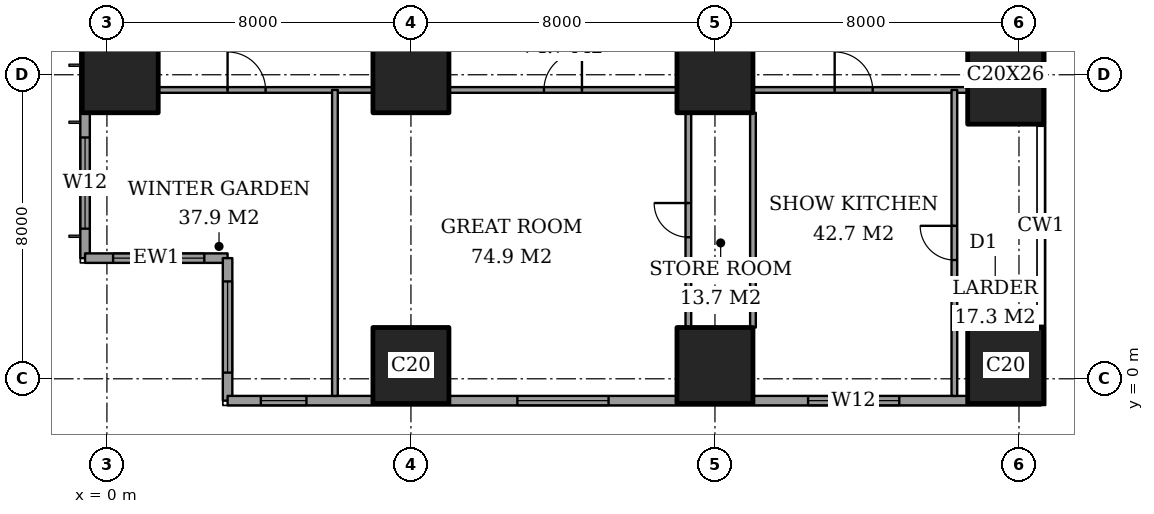
"""IFC4 building model, lengths in metres.
Left out: names, types, materials, properties, quantities, classifications, styles, units other than length and angle.
Written with IfcOpenShell. Run it as: python <this file> out.ifc"""

import sys

from ifc_helpers import new_model, si_unit, direction, frame, frame_2d, origin, origin_2d, place, context, subcontext, project, spatial, rectangle, extrude, element, fill, save


model = new_model("IFC4")
c1 = context("Model", 3, precision=1e-05, world=origin(), true_north=direction((0.0, 1.0)))
c2 = subcontext(c1, "Body", "Model", "MODEL_VIEW")
j1 = project(units=[si_unit("LENGTHUNIT", "METRE"), si_unit("PLANEANGLEUNIT", "RADIAN")], contexts=[c1])
p1 = place(None, origin())
s1 = spatial("IfcSite", under=j1, at=p1, CompositionType="ELEMENT")
p2 = place(p1, origin())
s2 = spatial("IfcBuilding", under=s1, at=p2, CompositionType="ELEMENT")
p3 = place(p2, frame((0.0, 0.0, 110.6)))
s3 = spatial("IfcBuildingStorey", under=s2, at=p3, CompositionType="ELEMENT", Elevation=110.6)
for number, where, z_axis, x_axis in (
    (1, (0.35, 8.0, 0.0), (0.0, 0.0, 1.0), (1.0, 0.0, 0.0)),
    (2, (8.0, 0.35, 0.0), (0.0, 0.0, 1.0), (1.0, 0.0, 0.0)),
    (3, (8.0, 8.0, 0.0), (0.0, 0.0, 1.0), (1.0, 0.0, 0.0)),
    (4, (16.0, 0.35, 0.0), (0.0, 0.0, 1.0), (1.0, 0.0, 0.0)),
    (5, (16.0, 8.0, 0.0), (0.0, 0.0, 1.0), (1.0, 0.0, 0.0)),
    (6, (23.65, 0.35, 0.0), (0.0, 0.0, 1.0), (1.0, 0.0, 0.0)),
):
    element("IfcColumn", number, at=place(p3, frame(where, z_axis=z_axis, x_axis=x_axis)), inside=s3, PredefinedType="COLUMN", context=c2, shape_type="SweptSolid", body=[
        extrude(rectangle(XDim=2.0, YDim=2.0, at=origin_2d()), origin(), (0.0, 0.0, 1.0), 3.6),
    ])
p4 = place(p3, frame((23.65, 8.0, 0.0), z_axis=(0.0, 0.0, 1.0), x_axis=(1.0, 0.0, 0.0)))
e7 = element("IfcColumn", 7, at=p4, inside=s3, PredefinedType="COLUMN", context=c2, shape_type="SweptSolid", body=[
    extrude(rectangle(XDim=2.0, YDim=2.6, at=origin_2d()), origin(), (0.0, 0.0, 1.0), 3.6),
])
p5 = place(p3, frame((-0.575, 44.825, 0.0), z_axis=(0.0, 0.0, 1.0), x_axis=(0.0, -1.0, 0.0)))
e8 = element("IfcWall", 8, at=p5, inside=s3, PredefinedType="SOLIDWALL", context=c2, shape_type="SweptSolid", body=[
    extrude(rectangle(XDim=41.65, YDim=0.25, at=frame_2d((20.825, 0.0))), origin(), (0.0, 0.0, 1.0), 3.6),
])
p6 = place(p5, frame((0.775, 0.0, 0.4)))
e9 = element("IfcOpeningElement", 9, at=p6, cuts=e8, PredefinedType="OPENING", context=c2, shape_type="SweptSolid", body=[
    extrude(rectangle(XDim=2.4, YDim=2.2, at=frame_2d((1.2, 1.1))), frame((0.0, 0.135, 0.0), z_axis=(0.0, -1.0, 0.0), x_axis=(1.0, 0.0, 0.0)), (0.0, 0.0, 1.0), 0.27),
])
p7 = place(p5, frame((6.2, 0.0, 0.4)))
e10 = element("IfcOpeningElement", 10, at=p7, cuts=e8, PredefinedType="OPENING", context=c2, shape_type="SweptSolid", body=[
    extrude(rectangle(XDim=1.2, YDim=2.2, at=frame_2d((0.6, 1.1))), frame((0.0, 0.135, 0.0), z_axis=(0.0, -1.0, 0.0), x_axis=(1.0, 0.0, 0.0)), (0.0, 0.0, 1.0), 0.27),
])
p8 = place(p5, frame((8.525, 0.0, 0.4)))
e11 = element("IfcOpeningElement", 11, at=p8, cuts=e8, PredefinedType="OPENING", context=c2, shape_type="SweptSolid", body=[
    extrude(rectangle(XDim=2.4, YDim=2.2, at=frame_2d((1.2, 1.1))), frame((0.0, 0.135, 0.0), z_axis=(0.0, -1.0, 0.0), x_axis=(1.0, 0.0, 0.0)), (0.0, 0.0, 1.0), 0.27),
])
p9 = place(p5, frame((15.625, 0.0, 0.4)))
e12 = element("IfcOpeningElement", 12, at=p9, cuts=e8, PredefinedType="OPENING", context=c2, shape_type="SweptSolid", body=[
    extrude(rectangle(XDim=2.4, YDim=2.2, at=frame_2d((1.2, 1.1))), frame((0.0, 0.135, 0.0), z_axis=(0.0, -1.0, 0.0), x_axis=(1.0, 0.0, 0.0)), (0.0, 0.0, 1.0), 0.27),
])
p10 = place(p5, frame((23.625, 0.0, 0.4)))
e13 = element("IfcOpeningElement", 13, at=p10, cuts=e8, PredefinedType="OPENING", context=c2, shape_type="SweptSolid", body=[
    extrude(rectangle(XDim=2.4, YDim=2.2, at=frame_2d((1.2, 1.1))), frame((0.0, 0.135, 0.0), z_axis=(0.0, -1.0, 0.0), x_axis=(1.0, 0.0, 0.0)), (0.0, 0.0, 1.0), 0.27),
])
p11 = place(p5, frame((30.825, 0.0, 0.4)))
e14 = element("IfcOpeningElement", 14, at=p11, cuts=e8, PredefinedType="OPENING", context=c2, shape_type="SweptSolid", body=[
    extrude(rectangle(XDim=2.4, YDim=2.2, at=frame_2d((1.2, 1.1))), frame((0.0, 0.135, 0.0), z_axis=(0.0, -1.0, 0.0), x_axis=(1.0, 0.0, 0.0)), (0.0, 0.0, 1.0), 0.27),
])
p12 = place(p5, frame((34.5, 0.0, 0.4)))
e15 = element("IfcOpeningElement", 15, at=p12, cuts=e8, PredefinedType="OPENING", context=c2, shape_type="SweptSolid", body=[
    extrude(rectangle(XDim=1.2, YDim=2.2, at=frame_2d((0.6, 1.1))), frame((0.0, 0.135, 0.0), z_axis=(0.0, -1.0, 0.0), x_axis=(1.0, 0.0, 0.0)), (0.0, 0.0, 1.0), 0.27),
])
p13 = place(p5, frame((38.475, 0.0, 0.4)))
e16 = element("IfcOpeningElement", 16, at=p13, cuts=e8, PredefinedType="OPENING", context=c2, shape_type="SweptSolid", body=[
    extrude(rectangle(XDim=2.4, YDim=2.2, at=frame_2d((1.2, 1.1))), frame((0.0, 0.135, 0.0), z_axis=(0.0, -1.0, 0.0), x_axis=(1.0, 0.0, 0.0)), (0.0, 0.0, 1.0), 0.27),
])
p14 = place(p3, frame((-0.575, 3.175, 0.0), z_axis=(0.0, 0.0, 1.0), x_axis=(1.0, 0.0, 0.0)))
e17 = element("IfcWall", 17, at=p14, inside=s3, PredefinedType="SOLIDWALL", context=c2, shape_type="SweptSolid", body=[
    extrude(rectangle(XDim=3.75, YDim=0.25, at=frame_2d((1.875, 0.0))), origin(), (0.0, 0.0, 1.0), 3.6),
])
p15 = place(p14, frame((0.738, 0.0, 0.4)))
e18 = element("IfcOpeningElement", 18, at=p15, cuts=e17, PredefinedType="OPENING", context=c2, shape_type="SweptSolid", body=[
    extrude(rectangle(XDim=2.4, YDim=2.2, at=frame_2d((1.2, 1.1))), frame((0.0, 0.135, 0.0), z_axis=(0.0, -1.0, 0.0), x_axis=(1.0, 0.0, 0.0)), (0.0, 0.0, 1.0), 0.27),
])
p16 = place(p3, frame((3.175, 3.175, 0.0), z_axis=(0.0, 0.0, 1.0), x_axis=(0.0, -1.0, 0.0)))
e19 = element("IfcWall", 19, at=p16, inside=s3, PredefinedType="SOLIDWALL", context=c2, shape_type="SweptSolid", body=[
    extrude(rectangle(XDim=3.75, YDim=0.25, at=frame_2d((1.875, 0.0))), origin(), (0.0, 0.0, 1.0), 3.6),
])
p17 = place(p16, frame((0.613, 0.0, 0.4)))
e20 = element("IfcOpeningElement", 20, at=p17, cuts=e19, PredefinedType="OPENING", context=c2, shape_type="SweptSolid", body=[
    extrude(rectangle(XDim=2.4, YDim=2.2, at=frame_2d((1.2, 1.1))), frame((0.0, 0.135, 0.0), z_axis=(0.0, -1.0, 0.0), x_axis=(1.0, 0.0, 0.0)), (0.0, 0.0, 1.0), 0.27),
])
p18 = place(p3, frame((3.175, -0.575, 0.0), z_axis=(0.0, 0.0, 1.0), x_axis=(1.0, 0.0, 0.0)))
e21 = element("IfcWall", 21, at=p18, inside=s3, PredefinedType="SOLIDWALL", context=c2, shape_type="SweptSolid", body=[
    extrude(rectangle(XDim=21.4, YDim=0.25, at=frame_2d((10.7, 0.0))), origin(), (0.0, 0.0, 1.0), 3.6),
])
p19 = place(p18, frame((0.875, 0.0, 0.4)))
e22 = element("IfcOpeningElement", 22, at=p19, cuts=e21, PredefinedType="OPENING", context=c2, shape_type="SweptSolid", body=[
    extrude(rectangle(XDim=1.2, YDim=2.2, at=frame_2d((0.6, 1.1))), frame((0.0, 0.135, 0.0), z_axis=(0.0, -1.0, 0.0), x_axis=(1.0, 0.0, 0.0)), (0.0, 0.0, 1.0), 0.27),
])
p20 = place(p18, frame((7.625, 0.0, 0.4)))
e23 = element("IfcOpeningElement", 23, at=p20, cuts=e21, PredefinedType="OPENING", context=c2, shape_type="SweptSolid", body=[
    extrude(rectangle(XDim=2.4, YDim=2.2, at=frame_2d((1.2, 1.1))), frame((0.0, 0.135, 0.0), z_axis=(0.0, -1.0, 0.0), x_axis=(1.0, 0.0, 0.0)), (0.0, 0.0, 1.0), 0.27),
])
p21 = place(p18, frame((15.275, 0.0, 0.4)))
e24 = element("IfcOpeningElement", 24, at=p21, cuts=e21, PredefinedType="OPENING", context=c2, shape_type="SweptSolid", body=[
    extrude(rectangle(XDim=2.4, YDim=2.2, at=frame_2d((1.2, 1.1))), frame((0.0, 0.135, 0.0), z_axis=(0.0, -1.0, 0.0), x_axis=(1.0, 0.0, 0.0)), (0.0, 0.0, 1.0), 0.27),
])
p22 = place(p3, frame((1.35, 7.6, 0.0), z_axis=(0.0, 0.0, 1.0), x_axis=(1.0, 0.0, 0.0)))
e25 = element("IfcWall", 25, at=p22, inside=s3, PredefinedType="PARTITIONING", context=c2, shape_type="SweptSolid", body=[
    extrude(rectangle(XDim=5.65, YDim=0.15, at=frame_2d((2.825, 0.0))), origin(), (0.0, 0.0, 1.0), 3.35),
])
p23 = place(p22, frame((1.825, 0.0, 0.0)))
e26 = element("IfcOpeningElement", 26, at=p23, cuts=e25, PredefinedType="OPENING", context=c2, shape_type="SweptSolid", body=[
    extrude(rectangle(XDim=1.0, YDim=2.1, at=frame_2d((0.5, 1.05))), frame((0.0, 0.085, 0.0), z_axis=(0.0, -1.0, 0.0), x_axis=(1.0, 0.0, 0.0)), (0.0, 0.0, 1.0), 0.17),
])
p24 = place(p3, frame((9.0, 7.6, 0.0), z_axis=(0.0, 0.0, 1.0), x_axis=(1.0, 0.0, 0.0)))
e27 = element("IfcWall", 27, at=p24, inside=s3, PredefinedType="PARTITIONING", context=c2, shape_type="SweptSolid", body=[
    extrude(rectangle(XDim=6.0, YDim=0.15, at=frame_2d((3.0, 0.0))), origin(), (0.0, 0.0, 1.0), 3.35),
])
p25 = place(p24, frame((2.5, 0.0, 0.0)))
e28 = element("IfcOpeningElement", 28, at=p25, cuts=e27, PredefinedType="OPENING", context=c2, shape_type="SweptSolid", body=[
    extrude(rectangle(XDim=1.0, YDim=2.1, at=frame_2d((0.5, 1.05))), frame((0.0, 0.085, 0.0), z_axis=(0.0, -1.0, 0.0), x_axis=(1.0, 0.0, 0.0)), (0.0, 0.0, 1.0), 0.17),
])
p26 = place(p3, frame((17.0, 7.6, 0.0), z_axis=(0.0, 0.0, 1.0), x_axis=(1.0, 0.0, 0.0)))
e29 = element("IfcWall", 29, at=p26, inside=s3, PredefinedType="PARTITIONING", context=c2, shape_type="SweptSolid", body=[
    extrude(rectangle(XDim=5.65, YDim=0.15, at=frame_2d((2.825, 0.0))), origin(), (0.0, 0.0, 1.0), 3.35),
])
p27 = place(p26, frame((2.15, 0.0, 0.0)))
e30 = element("IfcOpeningElement", 30, at=p27, cuts=e29, PredefinedType="OPENING", context=c2, shape_type="SweptSolid", body=[
    extrude(rectangle(XDim=1.0, YDim=2.1, at=frame_2d((0.5, 1.05))), frame((0.0, 0.085, 0.0), z_axis=(0.0, -1.0, 0.0), x_axis=(1.0, 0.0, 0.0)), (0.0, 0.0, 1.0), 0.17),
])
p28 = place(p3, frame((6.0, -0.45, 0.0), z_axis=(0.0, 0.0, 1.0), x_axis=(0.0, 1.0, 0.0)))
e31 = element("IfcWall", 31, at=p28, inside=s3, PredefinedType="PARTITIONING", context=c2, shape_type="SweptSolid", body=[
    extrude(rectangle(XDim=8.05, YDim=0.15, at=frame_2d((4.025, 0.0))), origin(), (0.0, 0.0, 1.0), 3.35),
])
p29 = place(p3, frame((15.3, 1.35, 0.0), z_axis=(0.0, 0.0, 1.0), x_axis=(0.0, 1.0, 0.0)))
e32 = element("IfcWall", 32, at=p29, inside=s3, PredefinedType="PARTITIONING", context=c2, shape_type="SweptSolid", body=[
    extrude(rectangle(XDim=5.65, YDim=0.15, at=frame_2d((2.825, 0.0))), origin(), (0.0, 0.0, 1.0), 3.35),
])
p30 = place(p29, frame((2.375, 0.0, 0.0)))
e33 = element("IfcOpeningElement", 33, at=p30, cuts=e32, PredefinedType="OPENING", context=c2, shape_type="SweptSolid", body=[
    extrude(rectangle(XDim=0.9, YDim=2.1, at=frame_2d((0.45, 1.05))), frame((0.0, 0.085, 0.0), z_axis=(0.0, -1.0, 0.0), x_axis=(1.0, 0.0, 0.0)), (0.0, 0.0, 1.0), 0.17),
])
p31 = place(p3, frame((17.0, 1.35, 0.0), z_axis=(0.0, 0.0, 1.0), x_axis=(0.0, 1.0, 0.0)))
e34 = element("IfcWall", 34, at=p31, inside=s3, PredefinedType="PARTITIONING", context=c2, shape_type="SweptSolid", body=[
    extrude(rectangle(XDim=5.65, YDim=0.15, at=frame_2d((2.825, 0.0))), origin(), (0.0, 0.0, 1.0), 3.35),
])
p32 = place(p3, frame((22.3, -0.45, 0.0), z_axis=(0.0, 0.0, 1.0), x_axis=(0.0, 1.0, 0.0)))
e35 = element("IfcWall", 35, at=p32, inside=s3, PredefinedType="PARTITIONING", context=c2, shape_type="SweptSolid", body=[
    extrude(rectangle(XDim=8.05, YDim=0.15, at=frame_2d((4.025, 0.0))), origin(), (0.0, 0.0, 1.0), 3.35),
])
p33 = place(p32, frame((3.575, 0.0, 0.0)))
e36 = element("IfcOpeningElement", 36, at=p33, cuts=e35, PredefinedType="OPENING", context=c2, shape_type="SweptSolid", body=[
    extrude(rectangle(XDim=0.9, YDim=2.1, at=frame_2d((0.45, 1.05))), frame((0.0, 0.085, 0.0), z_axis=(0.0, -1.0, 0.0), x_axis=(1.0, 0.0, 0.0)), (0.0, 0.0, 1.0), 0.17),
])
p34 = place(p13, origin())
e37 = element("IfcWindow", 37, at=p34, inside=s3, PartitioningType="SINGLE_PANEL", PredefinedType="WINDOW", context=c2, shape_type="SweptSolid", body=[
    extrude(rectangle(XDim=2.4, YDim=2.2, at=frame_2d((1.2, 1.1))), frame((0.0, 0.03, 0.0), z_axis=(0.0, -1.0, 0.0), x_axis=(1.0, 0.0, 0.0)), (0.0, 0.0, 1.0), 0.06),
])
fill(e16, e37)
p35 = place(p15, origin())
e38 = element("IfcWindow", 38, at=p35, inside=s3, PartitioningType="SINGLE_PANEL", PredefinedType="WINDOW", context=c2, shape_type="SweptSolid", body=[
    extrude(rectangle(XDim=2.4, YDim=2.2, at=frame_2d((1.2, 1.1))), frame((0.0, 0.03, 0.0), z_axis=(0.0, -1.0, 0.0), x_axis=(1.0, 0.0, 0.0)), (0.0, 0.0, 1.0), 0.06),
])
fill(e18, e38)
p36 = place(p17, origin())
e39 = element("IfcWindow", 39, at=p36, inside=s3, PartitioningType="SINGLE_PANEL", PredefinedType="WINDOW", context=c2, shape_type="SweptSolid", body=[
    extrude(rectangle(XDim=2.4, YDim=2.2, at=frame_2d((1.2, 1.1))), frame((0.0, 0.03, 0.0), z_axis=(0.0, -1.0, 0.0), x_axis=(1.0, 0.0, 0.0)), (0.0, 0.0, 1.0), 0.06),
])
fill(e20, e39)
p37 = place(p19, origin())
e40 = element("IfcWindow", 40, at=p37, inside=s3, PartitioningType="SINGLE_PANEL", PredefinedType="WINDOW", context=c2, shape_type="SweptSolid", body=[
    extrude(rectangle(XDim=1.2, YDim=2.2, at=frame_2d((0.6, 1.1))), frame((0.0, 0.03, 0.0), z_axis=(0.0, -1.0, 0.0), x_axis=(1.0, 0.0, 0.0)), (0.0, 0.0, 1.0), 0.06),
])
fill(e22, e40)
p38 = place(p20, origin())
e41 = element("IfcWindow", 41, at=p38, inside=s3, PartitioningType="SINGLE_PANEL", PredefinedType="WINDOW", context=c2, shape_type="SweptSolid", body=[
    extrude(rectangle(XDim=2.4, YDim=2.2, at=frame_2d((1.2, 1.1))), frame((0.0, 0.03, 0.0), z_axis=(0.0, -1.0, 0.0), x_axis=(1.0, 0.0, 0.0)), (0.0, 0.0, 1.0), 0.06),
])
fill(e23, e41)
p39 = place(p21, origin())
e42 = element("IfcWindow", 42, at=p39, inside=s3, PartitioningType="SINGLE_PANEL", PredefinedType="WINDOW", context=c2, shape_type="SweptSolid", body=[
    extrude(rectangle(XDim=2.4, YDim=2.2, at=frame_2d((1.2, 1.1))), frame((0.0, 0.03, 0.0), z_axis=(0.0, -1.0, 0.0), x_axis=(1.0, 0.0, 0.0)), (0.0, 0.0, 1.0), 0.06),
])
fill(e24, e42)
p40 = place(p23, origin())
e43 = element("IfcDoor", 43, at=p40, inside=s3, OperationType="SINGLE_SWING_RIGHT", PredefinedType="DOOR", context=c2, shape_type="SweptSolid", body=[
    extrude(rectangle(XDim=1.0, YDim=2.1, at=frame_2d((0.5, 1.05))), frame((0.0, 0.025, 0.0), z_axis=(0.0, -1.0, 0.0), x_axis=(1.0, 0.0, 0.0)), (0.0, 0.0, 1.0), 0.05),
])
fill(e26, e43)
p41 = place(p25, origin())
e44 = element("IfcDoor", 44, at=p41, inside=s3, OperationType="SINGLE_SWING_LEFT", PredefinedType="DOOR", context=c2, shape_type="SweptSolid", body=[
    extrude(rectangle(XDim=1.0, YDim=2.1, at=frame_2d((0.5, 1.05))), frame((0.0, 0.025, 0.0), z_axis=(0.0, -1.0, 0.0), x_axis=(1.0, 0.0, 0.0)), (0.0, 0.0, 1.0), 0.05),
])
fill(e28, e44)
p42 = place(p30, origin())
e45 = element("IfcDoor", 45, at=p42, inside=s3, OperationType="SINGLE_SWING_LEFT", PredefinedType="DOOR", context=c2, shape_type="SweptSolid", body=[
    extrude(rectangle(XDim=0.9, YDim=2.1, at=frame_2d((0.45, 1.05))), frame((0.0, 0.025, 0.0), z_axis=(0.0, -1.0, 0.0), x_axis=(1.0, 0.0, 0.0)), (0.0, 0.0, 1.0), 0.05),
])
fill(e33, e45)
p43 = place(p27, origin())
e46 = element("IfcDoor", 46, at=p43, inside=s3, OperationType="SINGLE_SWING_RIGHT", PredefinedType="DOOR", context=c2, shape_type="SweptSolid", body=[
    extrude(rectangle(XDim=1.0, YDim=2.1, at=frame_2d((0.5, 1.05))), frame((0.0, 0.025, 0.0), z_axis=(0.0, -1.0, 0.0), x_axis=(1.0, 0.0, 0.0)), (0.0, 0.0, 1.0), 0.05),
])
fill(e30, e46)
p44 = place(p33, origin())
e47 = element("IfcDoor", 47, at=p44, inside=s3, OperationType="SINGLE_SWING_LEFT", PredefinedType="DOOR", context=c2, shape_type="SweptSolid", body=[
    extrude(rectangle(XDim=0.9, YDim=2.1, at=frame_2d((0.45, 1.05))), frame((0.0, 0.025, 0.0), z_axis=(0.0, -1.0, 0.0), x_axis=(1.0, 0.0, 0.0)), (0.0, 0.0, 1.0), 0.05),
])
fill(e36, e47)
save(model, sys.argv[1])
